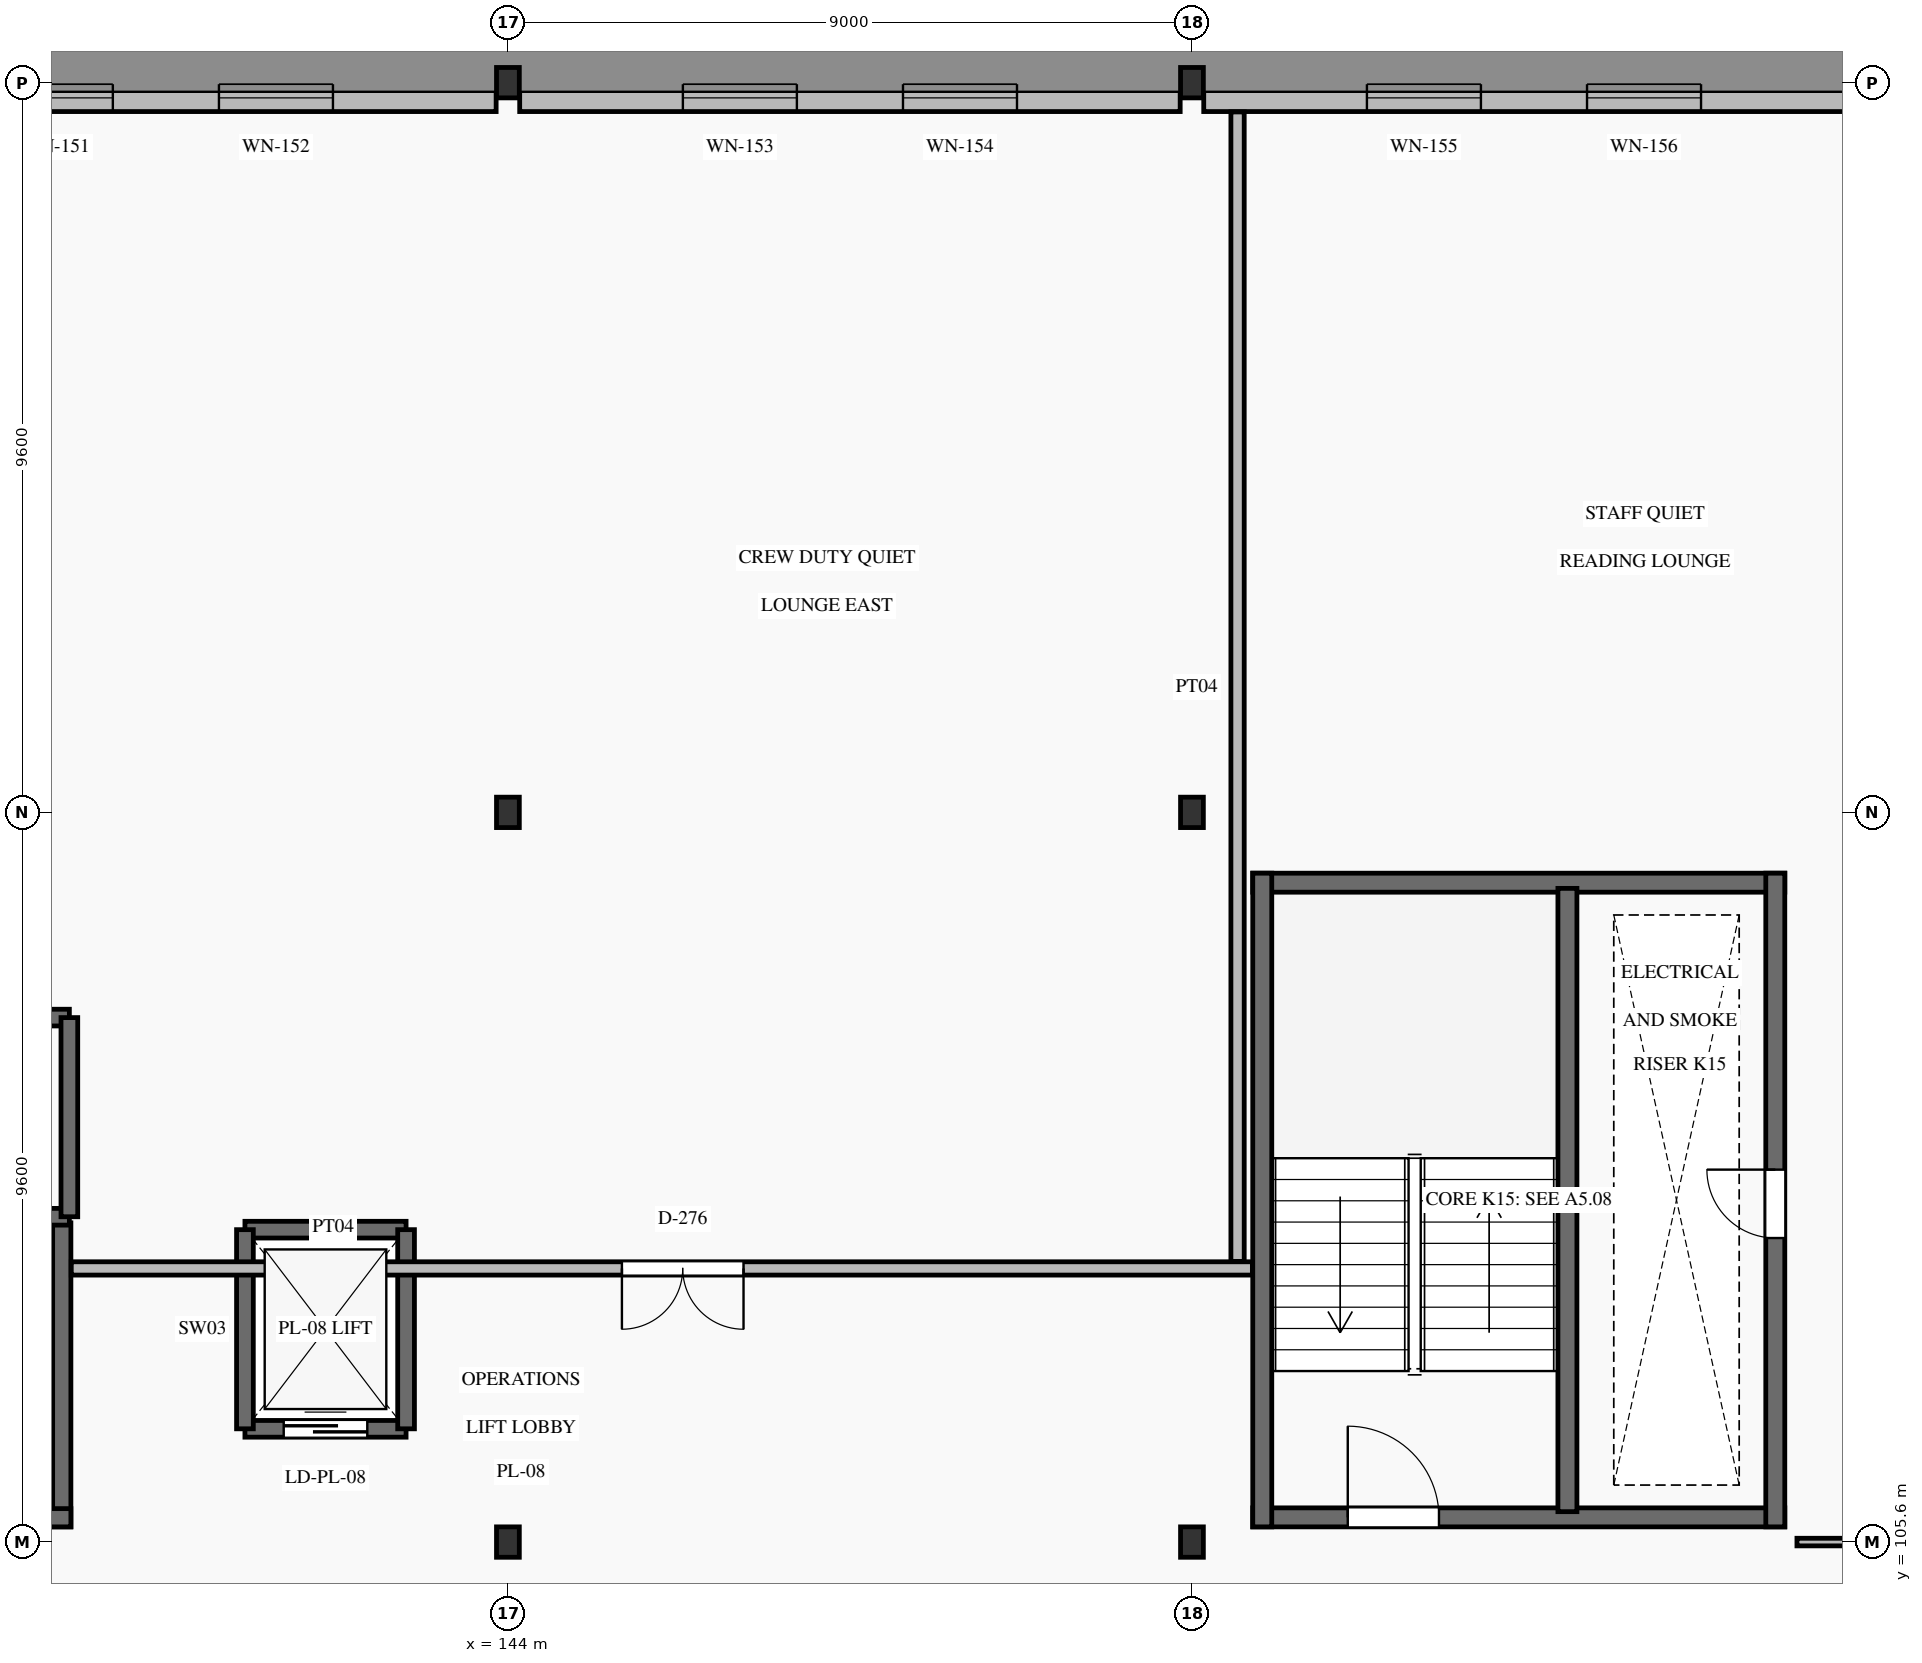
"""IFC4 building model, lengths in metres.
Left out: names, types, materials, properties, quantities, classifications, styles, units other than length and angle.
Written with IfcOpenShell. Run it as: python <this file> out.ifc"""

import sys

from ifc_helpers import new_model, si_unit, direction, frame, frame_2d, origin, origin_2d, place, context, subcontext, project, spatial, rectangle, i_section, extrude, element, fill, save


model = new_model("IFC4")
c1 = context("Model", 3, precision=1e-05, world=origin(), true_north=direction((0.0, 1.0)))
c2 = subcontext(c1, "Body", "Model", "MODEL_VIEW")
j1 = project(units=[si_unit("LENGTHUNIT", "METRE"), si_unit("PLANEANGLEUNIT", "RADIAN")], contexts=[c1])
p1 = place(None, origin())
s1 = spatial("IfcSite", under=j1, at=p1, CompositionType="ELEMENT")
p2 = place(p1, origin())
s2 = spatial("IfcBuilding", under=s1, at=p2, CompositionType="ELEMENT")
p3 = place(p2, frame((0.0, 0.0, 15.0)))
s3 = spatial("IfcBuildingStorey", under=s2, at=p3, CompositionType="ELEMENT", Elevation=15.0)
for number, where, z_axis, x_axis in (
    (1, (144.0, 105.6, 0.0), (0.0, 0.0, 1.0), (1.0, 0.0, 0.0)),
    (2, (144.0, 115.2, 0.0), (0.0, 0.0, 1.0), (1.0, 0.0, 0.0)),
    (3, (144.0, 124.8, 0.0), (0.0, 0.0, 1.0), (1.0, 0.0, 0.0)),
    (4, (153.0, 105.6, 0.0), (0.0, 0.0, 1.0), (1.0, 0.0, 0.0)),
    (5, (153.0, 115.2, 0.0), (0.0, 0.0, 1.0), (1.0, 0.0, 0.0)),
    (6, (153.0, 124.8, 0.0), (0.0, 0.0, 1.0), (1.0, 0.0, 0.0)),
):
    element("IfcColumn", number, at=place(p3, frame(where, z_axis=z_axis, x_axis=x_axis)), inside=s3, PredefinedType="COLUMN", context=c2, shape_type="SweptSolid", body=[
        extrude(i_section(OverallWidth=0.3, OverallDepth=0.4, WebThickness=0.013, FlangeThickness=0.024, FilletRadius=0.027, at=origin_2d()), origin(), (0.0, 0.0, 1.0), 3.9),
    ])
p4 = place(p3, frame((135.155, 124.6, 0.0), z_axis=(0.0, 0.0, 1.0), x_axis=(1.0, 0.0, 0.0)))
e7 = element("IfcWall", 7, at=p4, inside=s3, PredefinedType="SOLIDWALL", context=c2, shape_type="SweptSolid", body=[
    extrude(rectangle(XDim=8.69, YDim=0.36, at=frame_2d((4.345, 0.0))), origin(), (0.0, 0.0, 1.0), 3.36),
])
p5 = place(p4, frame((2.147, 0.0, 0.95)))
e8 = element("IfcOpeningElement", 8, at=p5, cuts=e7, PredefinedType="OPENING", context=c2, shape_type="SweptSolid", body=[
    extrude(rectangle(XDim=1.5, YDim=2.1, at=frame_2d((0.75, 1.05))), frame((0.0, 0.195, 0.0), z_axis=(0.0, -1.0, 0.0), x_axis=(1.0, 0.0, 0.0)), (0.0, 0.0, 1.0), 0.39),
])
p6 = place(p4, frame((5.043, 0.0, 0.95)))
e9 = element("IfcOpeningElement", 9, at=p6, cuts=e7, PredefinedType="OPENING", context=c2, shape_type="SweptSolid", body=[
    extrude(rectangle(XDim=1.5, YDim=2.1, at=frame_2d((0.75, 1.05))), frame((0.0, 0.195, 0.0), z_axis=(0.0, -1.0, 0.0), x_axis=(1.0, 0.0, 0.0)), (0.0, 0.0, 1.0), 0.39),
])
p7 = place(p3, frame((144.155, 124.6, 0.0), z_axis=(0.0, 0.0, 1.0), x_axis=(1.0, 0.0, 0.0)))
e10 = element("IfcWall", 10, at=p7, inside=s3, PredefinedType="SOLIDWALL", context=c2, shape_type="SweptSolid", body=[
    extrude(rectangle(XDim=8.69, YDim=0.36, at=frame_2d((4.345, 0.0))), origin(), (0.0, 0.0, 1.0), 3.36),
])
p8 = place(p7, frame((2.147, 0.0, 0.95)))
e11 = element("IfcOpeningElement", 11, at=p8, cuts=e10, PredefinedType="OPENING", context=c2, shape_type="SweptSolid", body=[
    extrude(rectangle(XDim=1.5, YDim=2.1, at=frame_2d((0.75, 1.05))), frame((0.0, 0.195, 0.0), z_axis=(0.0, -1.0, 0.0), x_axis=(1.0, 0.0, 0.0)), (0.0, 0.0, 1.0), 0.39),
])
p9 = place(p7, frame((5.043, 0.0, 0.95)))
e12 = element("IfcOpeningElement", 12, at=p9, cuts=e10, PredefinedType="OPENING", context=c2, shape_type="SweptSolid", body=[
    extrude(rectangle(XDim=1.5, YDim=2.1, at=frame_2d((0.75, 1.05))), frame((0.0, 0.195, 0.0), z_axis=(0.0, -1.0, 0.0), x_axis=(1.0, 0.0, 0.0)), (0.0, 0.0, 1.0), 0.39),
])
p10 = place(p3, frame((153.155, 124.6, 0.0), z_axis=(0.0, 0.0, 1.0), x_axis=(1.0, 0.0, 0.0)))
e13 = element("IfcWall", 13, at=p10, inside=s3, PredefinedType="SOLIDWALL", context=c2, shape_type="SweptSolid", body=[
    extrude(rectangle(XDim=8.69, YDim=0.36, at=frame_2d((4.345, 0.0))), origin(), (0.0, 0.0, 1.0), 3.36),
])
p11 = place(p10, frame((2.147, 0.0, 0.95)))
e14 = element("IfcOpeningElement", 14, at=p11, cuts=e13, PredefinedType="OPENING", context=c2, shape_type="SweptSolid", body=[
    extrude(rectangle(XDim=1.5, YDim=2.1, at=frame_2d((0.75, 1.05))), frame((0.0, 0.195, 0.0), z_axis=(0.0, -1.0, 0.0), x_axis=(1.0, 0.0, 0.0)), (0.0, 0.0, 1.0), 0.39),
])
p12 = place(p10, frame((5.043, 0.0, 0.95)))
e15 = element("IfcOpeningElement", 15, at=p12, cuts=e13, PredefinedType="OPENING", context=c2, shape_type="SweptSolid", body=[
    extrude(rectangle(XDim=1.5, YDim=2.1, at=frame_2d((0.75, 1.05))), frame((0.0, 0.195, 0.0), z_axis=(0.0, -1.0, 0.0), x_axis=(1.0, 0.0, 0.0)), (0.0, 0.0, 1.0), 0.39),
])
p13 = place(p3, frame((138.13, 105.8, 0.0), z_axis=(0.0, 0.0, 1.0), x_axis=(0.0, 1.0, 0.0)))
e16 = element("IfcWall", 16, at=p13, inside=s3, PredefinedType="SHEAR", context=c2, shape_type="SweptSolid", body=[
    extrude(rectangle(XDim=4.0, YDim=0.24, at=frame_2d((2.0, 0.0))), origin(), (0.0, 0.0, 1.0), 3.9),
])
p14 = place(p3, frame((134.05, 105.92, 0.0), z_axis=(0.0, 0.0, 1.0), x_axis=(1.0, 0.0, 0.0)))
e17 = element("IfcWall", 17, at=p14, inside=s3, PredefinedType="SHEAR", context=c2, shape_type="SweptSolid", body=[
    extrude(rectangle(XDim=4.2, YDim=0.24, at=frame_2d((2.1, 0.0))), origin(), (0.0, 0.0, 1.0), 3.9),
])
p15 = place(p14, frame((1.4, 0.0, 0.0)))
e18 = element("IfcOpeningElement", 18, at=p15, cuts=e17, PredefinedType="OPENING", context=c2, shape_type="SweptSolid", body=[
    extrude(rectangle(XDim=1.4, YDim=2.2, at=frame_2d((0.7, 1.1))), frame((0.0, 0.135, 0.0), z_axis=(0.0, -1.0, 0.0), x_axis=(1.0, 0.0, 0.0)), (0.0, 0.0, 1.0), 0.27),
])
p16 = place(p3, frame((153.8, 105.925, 0.0), z_axis=(0.0, 0.0, 1.0), x_axis=(1.0, 0.0, 0.0)))
e19 = element("IfcWall", 19, at=p16, inside=s3, PredefinedType="SHEAR", context=c2, shape_type="SweptSolid", body=[
    extrude(rectangle(XDim=7.0, YDim=0.25, at=frame_2d((3.5, 0.0))), origin(), (0.0, 0.0, 1.0), 3.9),
])
p17 = place(p16, frame((1.25, 0.0, 0.0)))
e20 = element("IfcOpeningElement", 20, at=p17, cuts=e19, PredefinedType="OPENING", context=c2, shape_type="SweptSolid", body=[
    extrude(rectangle(XDim=1.2, YDim=2.15, at=frame_2d((0.6, 1.075))), frame((0.0, 0.14, 0.0), z_axis=(0.0, -1.0, 0.0), x_axis=(1.0, 0.0, 0.0)), (0.0, 0.0, 1.0), 0.28),
])
p18 = place(p3, frame((153.8, 114.275, 0.0), z_axis=(0.0, 0.0, 1.0), x_axis=(1.0, 0.0, 0.0)))
e21 = element("IfcWall", 21, at=p18, inside=s3, PredefinedType="SHEAR", context=c2, shape_type="SweptSolid", body=[
    extrude(rectangle(XDim=7.0, YDim=0.25, at=frame_2d((3.5, 0.0))), origin(), (0.0, 0.0, 1.0), 3.9),
])
p19 = place(p3, frame((153.925, 105.8, 0.0), z_axis=(0.0, 0.0, 1.0), x_axis=(0.0, 1.0, 0.0)))
e22 = element("IfcWall", 22, at=p19, inside=s3, PredefinedType="SHEAR", context=c2, shape_type="SweptSolid", body=[
    extrude(rectangle(XDim=8.6, YDim=0.25, at=frame_2d((4.3, 0.0))), origin(), (0.0, 0.0, 1.0), 3.9),
])
p20 = place(p3, frame((160.675, 105.8, 0.0), z_axis=(0.0, 0.0, 1.0), x_axis=(0.0, 1.0, 0.0)))
e23 = element("IfcWall", 23, at=p20, inside=s3, PredefinedType="SHEAR", context=c2, shape_type="SweptSolid", body=[
    extrude(rectangle(XDim=8.6, YDim=0.25, at=frame_2d((4.3, 0.0))), origin(), (0.0, 0.0, 1.0), 3.9),
])
p21 = place(p20, frame((3.8, 0.0, 0.0)))
e24 = element("IfcOpeningElement", 24, at=p21, cuts=e23, PredefinedType="OPENING", context=c2, shape_type="SweptSolid", body=[
    extrude(rectangle(XDim=0.9, YDim=2.05, at=frame_2d((0.45, 1.025))), frame((0.0, 0.14, 0.0), z_axis=(0.0, -1.0, 0.0), x_axis=(1.0, 0.0, 0.0)), (0.0, 0.0, 1.0), 0.28),
])
p22 = place(p3, frame((157.94, 106.0, 0.0), z_axis=(0.0, 0.0, 1.0), x_axis=(0.0, 1.0, 0.0)))
e25 = element("IfcWall", 25, at=p22, inside=s3, PredefinedType="SHEAR", context=c2, shape_type="SweptSolid", body=[
    extrude(rectangle(XDim=8.2, YDim=0.25, at=frame_2d((4.1, 0.0))), origin(), (0.0, 0.0, 1.0), 3.9),
])
p23 = place(p3, frame((140.54, 107.09, 0.0), z_axis=(0.0, 0.0, 1.0), x_axis=(1.0, 0.0, 0.0)))
e26 = element("IfcWall", 26, at=p23, inside=s3, PredefinedType="SHEAR", context=c2, shape_type="SweptSolid", body=[
    extrude(rectangle(XDim=2.12, YDim=0.22, at=frame_2d((1.06, 0.0))), origin(), (0.0, 0.0, 1.0), 3.9),
])
p24 = place(p23, frame((0.51, 0.0, 0.0)))
e27 = element("IfcOpeningElement", 27, at=p24, cuts=e26, PredefinedType="OPENING", context=c2, shape_type="SweptSolid", body=[
    extrude(rectangle(XDim=1.1, YDim=2.15, at=frame_2d((0.55, 1.075))), frame((0.0, 0.125, 0.0), z_axis=(0.0, -1.0, 0.0), x_axis=(1.0, 0.0, 0.0)), (0.0, 0.0, 1.0), 0.25),
])
p25 = place(p3, frame((140.54, 109.71, 0.0), z_axis=(0.0, 0.0, 1.0), x_axis=(1.0, 0.0, 0.0)))
e28 = element("IfcWall", 28, at=p25, inside=s3, PredefinedType="SHEAR", context=c2, shape_type="SweptSolid", body=[
    extrude(rectangle(XDim=2.12, YDim=0.22, at=frame_2d((1.06, 0.0))), origin(), (0.0, 0.0, 1.0), 3.9),
])
for number, where, z_axis, x_axis in (
    (29, (140.54, 107.09, 0.0), (0.0, 0.0, 1.0), (0.0, 1.0, 0.0)),
    (30, (142.66, 107.09, 0.0), (0.0, 0.0, 1.0), (0.0, 1.0, 0.0)),
):
    element("IfcWall", number, at=place(p3, frame(where, z_axis=z_axis, x_axis=x_axis)), inside=s3, PredefinedType="SHEAR", context=c2, shape_type="SweptSolid", body=[
        extrude(rectangle(XDim=2.62, YDim=0.22, at=frame_2d((1.31, 0.0))), origin(), (0.0, 0.0, 1.0), 3.9),
    ])
p26 = place(p3, frame((134.07, 109.88, 0.0), z_axis=(0.0, 0.0, 1.0), x_axis=(1.0, 0.0, 0.0)))
e31 = element("IfcWall", 31, at=p26, inside=s3, PredefinedType="SHEAR", context=c2, shape_type="SweptSolid", body=[
    extrude(rectangle(XDim=4.16, YDim=0.22, at=frame_2d((2.08, 0.0))), origin(), (0.0, 0.0, 1.0), 3.9),
])
p27 = place(p26, frame((1.53, 0.0, 0.0)))
e32 = element("IfcOpeningElement", 32, at=p27, cuts=e31, PredefinedType="OPENING", context=c2, shape_type="SweptSolid", body=[
    extrude(rectangle(XDim=1.1, YDim=2.15, at=frame_2d((0.55, 1.075))), frame((0.0, 0.125, 0.0), z_axis=(0.0, -1.0, 0.0), x_axis=(1.0, 0.0, 0.0)), (0.0, 0.0, 1.0), 0.25),
])
p28 = place(p3, frame((134.07, 112.5, 0.0), z_axis=(0.0, 0.0, 1.0), x_axis=(1.0, 0.0, 0.0)))
e33 = element("IfcWall", 33, at=p28, inside=s3, PredefinedType="SHEAR", context=c2, shape_type="SweptSolid", body=[
    extrude(rectangle(XDim=4.16, YDim=0.22, at=frame_2d((2.08, 0.0))), origin(), (0.0, 0.0, 1.0), 3.9),
])
p29 = place(p3, frame((138.23, 109.88, 0.0), z_axis=(0.0, 0.0, 1.0), x_axis=(0.0, 1.0, 0.0)))
e34 = element("IfcWall", 34, at=p29, inside=s3, PredefinedType="SHEAR", context=c2, shape_type="SweptSolid", body=[
    extrude(rectangle(XDim=2.62, YDim=0.22, at=frame_2d((1.31, 0.0))), origin(), (0.0, 0.0, 1.0), 3.9),
])
p30 = place(p3, frame((138.255, 109.2, 0.0), z_axis=(0.0, 0.0, 1.0), x_axis=(1.0, 0.0, 0.0)))
e35 = element("IfcWall", 35, at=p30, inside=s3, PredefinedType="PARTITIONING", context=c2, shape_type="SweptSolid", body=[
    extrude(rectangle(XDim=15.54, YDim=0.175, at=frame_2d((7.77, 0.0))), origin(), (0.0, 0.0, 1.0), 3.64),
])
p31 = place(p30, frame((7.245, 0.0, 0.0)))
e36 = element("IfcOpeningElement", 36, at=p31, cuts=e35, PredefinedType="OPENING", context=c2, shape_type="SweptSolid", body=[
    extrude(rectangle(XDim=1.6, YDim=2.25, at=frame_2d((0.8, 1.125))), frame((0.0, 0.103, 0.0), z_axis=(0.0, -1.0, 0.0), x_axis=(1.0, 0.0, 0.0)), (0.0, 0.0, 1.0), 0.205),
])
p32 = place(p3, frame((160.96, 105.6, 0.0), z_axis=(0.0, 0.0, 1.0), x_axis=(1.0, 0.0, 0.0)))
e37 = element("IfcWall", 37, at=p32, inside=s3, PredefinedType="PARTITIONING", context=c2, shape_type="SweptSolid", body=[
    extrude(rectangle(XDim=5.89, YDim=0.1, at=frame_2d((2.945, 0.0))), origin(), (0.0, 0.0, 1.0), 3.29),
])
p33 = place(p32, frame((2.845, 0.0, 0.0)))
e38 = element("IfcOpeningElement", 38, at=p33, cuts=e37, PredefinedType="OPENING", context=c2, shape_type="SweptSolid", body=[
    extrude(rectangle(XDim=1.6, YDim=2.25, at=frame_2d((0.8, 1.125))), frame((0.0, 0.065, 0.0), z_axis=(0.0, -1.0, 0.0), x_axis=(1.0, 0.0, 0.0)), (0.0, 0.0, 1.0), 0.13),
])
p34 = place(p3, frame((153.6, 109.292, 0.0), z_axis=(0.0, 0.0, 1.0), x_axis=(0.0, 1.0, 0.0)))
e39 = element("IfcWall", 39, at=p34, inside=s3, PredefinedType="PARTITIONING", context=c2, shape_type="SweptSolid", body=[
    extrude(rectangle(XDim=15.123, YDim=0.175, at=frame_2d((7.561, 0.0))), origin(), (0.0, 0.0, 1.0), 3.64),
])
p35 = place(p5, origin())
e40 = element("IfcWindow", 40, at=p35, inside=s3, PartitioningType="SINGLE_PANEL", PredefinedType="WINDOW", context=c2, shape_type="SweptSolid", body=[
    extrude(rectangle(XDim=1.5, YDim=2.1, at=frame_2d((0.75, 1.05))), frame((0.0, 0.03, 0.0), z_axis=(0.0, -1.0, 0.0), x_axis=(1.0, 0.0, 0.0)), (0.0, 0.0, 1.0), 0.06),
])
fill(e8, e40)
p36 = place(p6, origin())
e41 = element("IfcWindow", 41, at=p36, inside=s3, PartitioningType="SINGLE_PANEL", PredefinedType="WINDOW", context=c2, shape_type="SweptSolid", body=[
    extrude(rectangle(XDim=1.5, YDim=2.1, at=frame_2d((0.75, 1.05))), frame((0.0, 0.03, 0.0), z_axis=(0.0, -1.0, 0.0), x_axis=(1.0, 0.0, 0.0)), (0.0, 0.0, 1.0), 0.06),
])
fill(e9, e41)
p37 = place(p8, origin())
e42 = element("IfcWindow", 42, at=p37, inside=s3, PartitioningType="SINGLE_PANEL", PredefinedType="WINDOW", context=c2, shape_type="SweptSolid", body=[
    extrude(rectangle(XDim=1.5, YDim=2.1, at=frame_2d((0.75, 1.05))), frame((0.0, 0.03, 0.0), z_axis=(0.0, -1.0, 0.0), x_axis=(1.0, 0.0, 0.0)), (0.0, 0.0, 1.0), 0.06),
])
fill(e11, e42)
p38 = place(p9, origin())
e43 = element("IfcWindow", 43, at=p38, inside=s3, PartitioningType="SINGLE_PANEL", PredefinedType="WINDOW", context=c2, shape_type="SweptSolid", body=[
    extrude(rectangle(XDim=1.5, YDim=2.1, at=frame_2d((0.75, 1.05))), frame((0.0, 0.03, 0.0), z_axis=(0.0, -1.0, 0.0), x_axis=(1.0, 0.0, 0.0)), (0.0, 0.0, 1.0), 0.06),
])
fill(e12, e43)
p39 = place(p11, origin())
e44 = element("IfcWindow", 44, at=p39, inside=s3, PartitioningType="SINGLE_PANEL", PredefinedType="WINDOW", context=c2, shape_type="SweptSolid", body=[
    extrude(rectangle(XDim=1.5, YDim=2.1, at=frame_2d((0.75, 1.05))), frame((0.0, 0.03, 0.0), z_axis=(0.0, -1.0, 0.0), x_axis=(1.0, 0.0, 0.0)), (0.0, 0.0, 1.0), 0.06),
])
fill(e14, e44)
p40 = place(p12, origin())
e45 = element("IfcWindow", 45, at=p40, inside=s3, PartitioningType="SINGLE_PANEL", PredefinedType="WINDOW", context=c2, shape_type="SweptSolid", body=[
    extrude(rectangle(XDim=1.5, YDim=2.1, at=frame_2d((0.75, 1.05))), frame((0.0, 0.03, 0.0), z_axis=(0.0, -1.0, 0.0), x_axis=(1.0, 0.0, 0.0)), (0.0, 0.0, 1.0), 0.06),
])
fill(e15, e45)
p41 = place(p17, origin())
e46 = element("IfcDoor", 46, at=p41, inside=s3, OperationType="SINGLE_SWING_LEFT", PredefinedType="DOOR", context=c2, shape_type="SweptSolid", body=[
    extrude(rectangle(XDim=1.2, YDim=2.15, at=frame_2d((0.6, 1.075))), frame((0.0, 0.025, 0.0), z_axis=(0.0, -1.0, 0.0), x_axis=(1.0, 0.0, 0.0)), (0.0, 0.0, 1.0), 0.05),
])
fill(e20, e46)
p42 = place(p21, origin())
e47 = element("IfcDoor", 47, at=p42, inside=s3, OperationType="SINGLE_SWING_RIGHT", PredefinedType="DOOR", context=c2, shape_type="SweptSolid", body=[
    extrude(rectangle(XDim=0.9, YDim=2.05, at=frame_2d((0.45, 1.025))), frame((0.0, 0.025, 0.0), z_axis=(0.0, -1.0, 0.0), x_axis=(1.0, 0.0, 0.0)), (0.0, 0.0, 1.0), 0.05),
])
fill(e24, e47)
p43 = place(p24, origin())
e48 = element("IfcDoor", 48, at=p43, inside=s3, OperationType="SLIDING_TO_RIGHT", PredefinedType="DOOR", context=c2, shape_type="SweptSolid", body=[
    extrude(rectangle(XDim=1.1, YDim=2.15, at=frame_2d((0.55, 1.075))), frame((0.0, 0.025, 0.0), z_axis=(0.0, -1.0, 0.0), x_axis=(1.0, 0.0, 0.0)), (0.0, 0.0, 1.0), 0.05),
])
fill(e27, e48)
p44 = place(p31, frame((1.6, 0.0, 0.0), z_axis=(0.0, 0.0, 1.0), x_axis=(-1.0, 0.0, 0.0)))
e49 = element("IfcDoor", 49, at=p44, inside=s3, OperationType="DOUBLE_DOOR_SINGLE_SWING", PredefinedType="DOOR", context=c2, shape_type="SweptSolid", body=[
    extrude(rectangle(XDim=1.6, YDim=2.25, at=frame_2d((0.8, 1.125))), frame((0.0, 0.025, 0.0), z_axis=(0.0, -1.0, 0.0), x_axis=(1.0, 0.0, 0.0)), (0.0, 0.0, 1.0), 0.05),
])
fill(e36, e49)
save(model, sys.argv[1])
